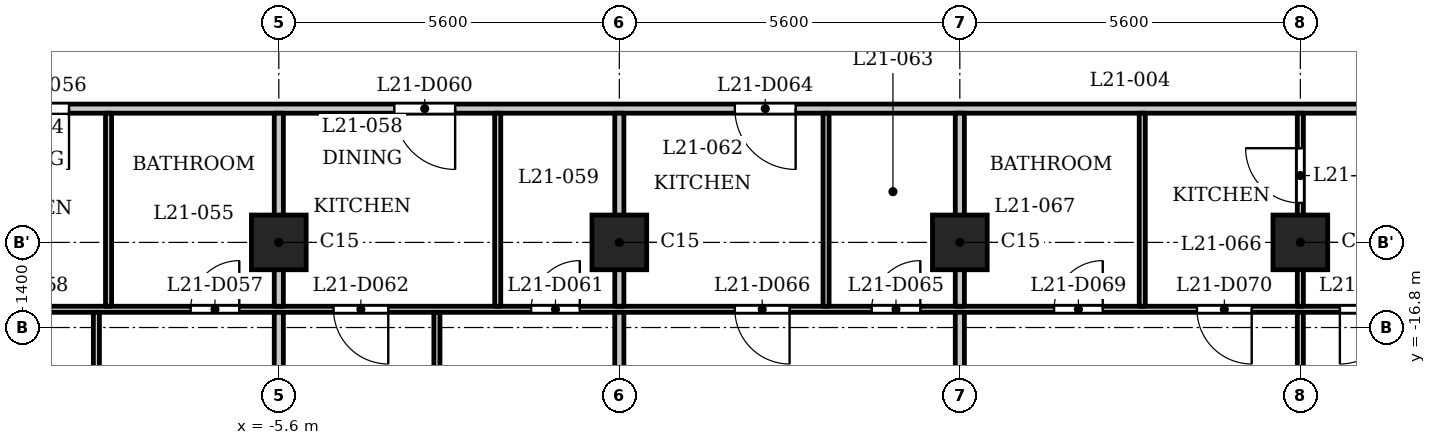
"""IFC4 building model, lengths in metres.
Left out: names, types, materials, properties, quantities, classifications, styles, units other than length and angle.
Written with IfcOpenShell. Run it as: python <this file> out.ifc"""

import sys

from ifc_helpers import new_model, si_unit, direction, frame, frame_2d, origin, origin_2d, place, context, subcontext, project, spatial, rectangle, extrude, element, fill, save


model = new_model("IFC4")
c1 = context("Model", 3, precision=1e-05, world=origin(), true_north=direction((0.0, 1.0)))
c2 = subcontext(c1, "Body", "Model", "MODEL_VIEW")
j1 = project(units=[si_unit("LENGTHUNIT", "METRE"), si_unit("PLANEANGLEUNIT", "RADIAN")], contexts=[c1])
p1 = place(None, origin())
s1 = spatial("IfcSite", under=j1, at=p1, CompositionType="ELEMENT")
p2 = place(p1, origin())
s2 = spatial("IfcBuilding", under=s1, at=p2, CompositionType="ELEMENT")
p3 = place(p2, frame((0.0, 0.0, 86.8)))
s3 = spatial("IfcBuildingStorey", under=s2, at=p3, CompositionType="ELEMENT", Elevation=86.8)
for number, where, z_axis, x_axis in (
    (1, (-5.6, -15.4, 0.0), (0.0, 0.0, 1.0), (1.0, 0.0, 0.0)),
    (2, (0.0, -15.4, 0.0), (0.0, 0.0, 1.0), (1.0, 0.0, 0.0)),
    (3, (5.6, -15.4, 0.0), (0.0, 0.0, 1.0), (1.0, 0.0, 0.0)),
    (4, (11.2, -15.4, 0.0), (0.0, 0.0, 1.0), (1.0, 0.0, 0.0)),
):
    element("IfcColumn", number, at=place(p3, frame(where, z_axis=z_axis, x_axis=x_axis)), inside=s3, PredefinedType="COLUMN", context=c2, shape_type="SweptSolid", body=[
        extrude(rectangle(XDim=0.9, YDim=0.9, at=origin_2d()), origin(), (0.0, 0.0, 1.0), 3.5),
    ])
p4 = place(p3, frame((-16.725, -16.5, 0.0), z_axis=(0.0, 0.0, 1.0), x_axis=(1.0, 0.0, 0.0)))
e5 = element("IfcWall", 5, at=p4, inside=s3, PredefinedType="PARTITIONING", context=c2, shape_type="SweptSolid", body=[
    extrude(rectangle(XDim=33.45, YDim=0.1, at=frame_2d((16.725, 0.0))), origin(), (0.0, 0.0, 1.0), 3.2),
])
p5 = place(p4, frame((3.825, 0.0, 0.0)))
e6 = element("IfcOpeningElement", 6, at=p5, cuts=e5, PredefinedType="OPENING", context=c2, shape_type="SweptSolid", body=[
    extrude(rectangle(XDim=0.8, YDim=2.1, at=frame_2d((0.4, 1.05))), frame((0.0, 0.06, 0.0), z_axis=(0.0, -1.0, 0.0), x_axis=(1.0, 0.0, 0.0)), (0.0, 0.0, 1.0), 0.12),
])
p6 = place(p4, frame((1.825, 0.0, 0.0)))
e7 = element("IfcOpeningElement", 7, at=p6, cuts=e5, PredefinedType="OPENING", context=c2, shape_type="SweptSolid", body=[
    extrude(rectangle(XDim=0.9, YDim=2.1, at=frame_2d((0.45, 1.05))), frame((0.0, 0.06, 0.0), z_axis=(0.0, -1.0, 0.0), x_axis=(1.0, 0.0, 0.0)), (0.0, 0.0, 1.0), 0.12),
])
p7 = place(p4, frame((9.675, 0.0, 0.0)))
e8 = element("IfcOpeningElement", 8, at=p7, cuts=e5, PredefinedType="OPENING", context=c2, shape_type="SweptSolid", body=[
    extrude(rectangle(XDim=0.8, YDim=2.1, at=frame_2d((0.4, 1.05))), frame((0.0, 0.06, 0.0), z_axis=(0.0, -1.0, 0.0), x_axis=(1.0, 0.0, 0.0)), (0.0, 0.0, 1.0), 0.12),
])
p8 = place(p4, frame((6.425, 0.0, 0.0)))
e9 = element("IfcOpeningElement", 9, at=p8, cuts=e5, PredefinedType="OPENING", context=c2, shape_type="SweptSolid", body=[
    extrude(rectangle(XDim=0.9, YDim=2.1, at=frame_2d((0.45, 1.05))), frame((0.0, 0.06, 0.0), z_axis=(0.0, -1.0, 0.0), x_axis=(1.0, 0.0, 0.0)), (0.0, 0.0, 1.0), 0.12),
])
p9 = place(p4, frame((15.275, 0.0, 0.0)))
e10 = element("IfcOpeningElement", 10, at=p9, cuts=e5, PredefinedType="OPENING", context=c2, shape_type="SweptSolid", body=[
    extrude(rectangle(XDim=0.8, YDim=2.1, at=frame_2d((0.4, 1.05))), frame((0.0, 0.06, 0.0), z_axis=(0.0, -1.0, 0.0), x_axis=(1.0, 0.0, 0.0)), (0.0, 0.0, 1.0), 0.12),
])
p10 = place(p4, frame((12.025, 0.0, 0.0)))
e11 = element("IfcOpeningElement", 11, at=p10, cuts=e5, PredefinedType="OPENING", context=c2, shape_type="SweptSolid", body=[
    extrude(rectangle(XDim=0.9, YDim=2.1, at=frame_2d((0.45, 1.05))), frame((0.0, 0.06, 0.0), z_axis=(0.0, -1.0, 0.0), x_axis=(1.0, 0.0, 0.0)), (0.0, 0.0, 1.0), 0.12),
])
p11 = place(p4, frame((20.875, 0.0, 0.0)))
e12 = element("IfcOpeningElement", 12, at=p11, cuts=e5, PredefinedType="OPENING", context=c2, shape_type="SweptSolid", body=[
    extrude(rectangle(XDim=0.8, YDim=2.1, at=frame_2d((0.4, 1.05))), frame((0.0, 0.06, 0.0), z_axis=(0.0, -1.0, 0.0), x_axis=(1.0, 0.0, 0.0)), (0.0, 0.0, 1.0), 0.12),
])
p12 = place(p4, frame((18.625, 0.0, 0.0)))
e13 = element("IfcOpeningElement", 13, at=p12, cuts=e5, PredefinedType="OPENING", context=c2, shape_type="SweptSolid", body=[
    extrude(rectangle(XDim=0.9, YDim=2.1, at=frame_2d((0.45, 1.05))), frame((0.0, 0.06, 0.0), z_axis=(0.0, -1.0, 0.0), x_axis=(1.0, 0.0, 0.0)), (0.0, 0.0, 1.0), 0.12),
])
p13 = place(p4, frame((23.875, 0.0, 0.0)))
e14 = element("IfcOpeningElement", 14, at=p13, cuts=e5, PredefinedType="OPENING", context=c2, shape_type="SweptSolid", body=[
    extrude(rectangle(XDim=0.8, YDim=2.1, at=frame_2d((0.4, 1.05))), frame((0.0, 0.06, 0.0), z_axis=(0.0, -1.0, 0.0), x_axis=(1.0, 0.0, 0.0)), (0.0, 0.0, 1.0), 0.12),
])
p14 = place(p4, frame((26.225, 0.0, 0.0)))
e15 = element("IfcOpeningElement", 15, at=p14, cuts=e5, PredefinedType="OPENING", context=c2, shape_type="SweptSolid", body=[
    extrude(rectangle(XDim=0.9, YDim=2.1, at=frame_2d((0.45, 1.05))), frame((0.0, 0.06, 0.0), z_axis=(0.0, -1.0, 0.0), x_axis=(1.0, 0.0, 0.0)), (0.0, 0.0, 1.0), 0.12),
])
p15 = place(p4, frame((28.575, 0.0, 0.0)))
e16 = element("IfcOpeningElement", 16, at=p15, cuts=e5, PredefinedType="OPENING", context=c2, shape_type="SweptSolid", body=[
    extrude(rectangle(XDim=0.9, YDim=2.1, at=frame_2d((0.45, 1.05))), frame((0.0, 0.06, 0.0), z_axis=(0.0, -1.0, 0.0), x_axis=(1.0, 0.0, 0.0)), (0.0, 0.0, 1.0), 0.12),
])
p16 = place(p4, frame((30.675, 0.0, 0.0)))
e17 = element("IfcOpeningElement", 17, at=p16, cuts=e5, PredefinedType="OPENING", context=c2, shape_type="SweptSolid", body=[
    extrude(rectangle(XDim=0.9, YDim=2.1, at=frame_2d((0.45, 1.05))), frame((0.0, 0.06, 0.0), z_axis=(0.0, -1.0, 0.0), x_axis=(1.0, 0.0, 0.0)), (0.0, 0.0, 1.0), 0.12),
])
p17 = place(p3, frame((-17.4, -13.2, 0.0), z_axis=(0.0, 0.0, 1.0), x_axis=(1.0, 0.0, 0.0)))
e18 = element("IfcWall", 18, at=p17, inside=s3, PredefinedType="PARTITIONING", context=c2, shape_type="SweptSolid", body=[
    extrude(rectangle(XDim=34.8, YDim=0.15, at=frame_2d((17.4, 0.0))), origin(), (0.0, 0.0, 1.0), 3.2),
])
p18 = place(p17, frame((0.15, 0.0, 0.0)))
e19 = element("IfcOpeningElement", 19, at=p18, cuts=e18, PredefinedType="OPENING", context=c2, shape_type="SweptSolid", body=[
    extrude(rectangle(XDim=1.0, YDim=2.1, at=frame_2d((0.5, 1.05))), frame((0.0, 0.085, 0.0), z_axis=(0.0, -1.0, 0.0), x_axis=(1.0, 0.0, 0.0)), (0.0, 0.0, 1.0), 0.17),
])
p19 = place(p17, frame((33.55, 0.0, 0.0)))
e20 = element("IfcOpeningElement", 20, at=p19, cuts=e18, PredefinedType="OPENING", context=c2, shape_type="SweptSolid", body=[
    extrude(rectangle(XDim=1.0, YDim=2.1, at=frame_2d((0.5, 1.05))), frame((0.0, 0.085, 0.0), z_axis=(0.0, -1.0, 0.0), x_axis=(1.0, 0.0, 0.0)), (0.0, 0.0, 1.0), 0.17),
])
p20 = place(p17, frame((7.35, 0.0, 0.0)))
e21 = element("IfcOpeningElement", 21, at=p20, cuts=e18, PredefinedType="OPENING", context=c2, shape_type="SweptSolid", body=[
    extrude(rectangle(XDim=1.0, YDim=2.1, at=frame_2d((0.5, 1.05))), frame((0.0, 0.085, 0.0), z_axis=(0.0, -1.0, 0.0), x_axis=(1.0, 0.0, 0.0)), (0.0, 0.0, 1.0), 0.17),
])
p21 = place(p17, frame((13.7, 0.0, 0.0)))
e22 = element("IfcOpeningElement", 22, at=p21, cuts=e18, PredefinedType="OPENING", context=c2, shape_type="SweptSolid", body=[
    extrude(rectangle(XDim=1.0, YDim=2.1, at=frame_2d((0.5, 1.05))), frame((0.0, 0.085, 0.0), z_axis=(0.0, -1.0, 0.0), x_axis=(1.0, 0.0, 0.0)), (0.0, 0.0, 1.0), 0.17),
])
p22 = place(p17, frame((19.3, 0.0, 0.0)))
e23 = element("IfcOpeningElement", 23, at=p22, cuts=e18, PredefinedType="OPENING", context=c2, shape_type="SweptSolid", body=[
    extrude(rectangle(XDim=1.0, YDim=2.1, at=frame_2d((0.5, 1.05))), frame((0.0, 0.085, 0.0), z_axis=(0.0, -1.0, 0.0), x_axis=(1.0, 0.0, 0.0)), (0.0, 0.0, 1.0), 0.17),
])
p23 = place(p3, frame((-8.6, -22.08, 0.0), z_axis=(0.0, 0.0, 1.0), x_axis=(0.0, 1.0, 0.0)))
e24 = element("IfcWall", 24, at=p23, inside=s3, PredefinedType="PARTITIONING", context=c2, shape_type="SweptSolid", body=[
    extrude(rectangle(XDim=5.53, YDim=0.1, at=frame_2d((2.765, 0.0))), origin(), (0.0, 0.0, 1.0), 3.2),
])
p24 = place(p23, frame((0.42, 0.0, 0.0)))
e25 = element("IfcOpeningElement", 25, at=p24, cuts=e24, PredefinedType="OPENING", context=c2, shape_type="SweptSolid", body=[
    extrude(rectangle(XDim=0.9, YDim=2.1, at=frame_2d((0.45, 1.05))), frame((0.0, 0.06, 0.0), z_axis=(0.0, -1.0, 0.0), x_axis=(1.0, 0.0, 0.0)), (0.0, 0.0, 1.0), 0.12),
])
p25 = place(p3, frame((-8.4, -16.45, 0.0), z_axis=(0.0, 0.0, 1.0), x_axis=(0.0, 1.0, 0.0)))
e26 = element("IfcWall", 26, at=p25, inside=s3, PredefinedType="PARTITIONING", context=c2, shape_type="SweptSolid", body=[
    extrude(rectangle(XDim=3.175, YDim=0.1, at=frame_2d((1.587, 0.0))), origin(), (0.0, 0.0, 1.0), 3.2),
])
p26 = place(p3, frame((-5.6, -23.03, 0.0), z_axis=(0.0, 0.0, 1.0), x_axis=(0.0, 1.0, 0.0)))
e27 = element("IfcWall", 27, at=p26, inside=s3, PredefinedType="PARTITIONING", context=c2, shape_type="SweptSolid", body=[
    extrude(rectangle(XDim=6.48, YDim=0.15, at=frame_2d((3.24, 0.0))), origin(), (0.0, 0.0, 1.0), 3.2),
])
p27 = place(p3, frame((-5.6, -16.45, 0.0), z_axis=(0.0, 0.0, 1.0), x_axis=(0.0, 1.0, 0.0)))
e28 = element("IfcWall", 28, at=p27, inside=s3, PredefinedType="PARTITIONING", context=c2, shape_type="SweptSolid", body=[
    extrude(rectangle(XDim=3.175, YDim=0.15, at=frame_2d((1.587, 0.0))), origin(), (0.0, 0.0, 1.0), 3.2),
])
p28 = place(p3, frame((-3.0, -22.08, 0.0), z_axis=(0.0, 0.0, 1.0), x_axis=(0.0, 1.0, 0.0)))
e29 = element("IfcWall", 29, at=p28, inside=s3, PredefinedType="PARTITIONING", context=c2, shape_type="SweptSolid", body=[
    extrude(rectangle(XDim=5.53, YDim=0.1, at=frame_2d((2.765, 0.0))), origin(), (0.0, 0.0, 1.0), 3.2),
])
p29 = place(p28, frame((0.42, 0.0, 0.0)))
e30 = element("IfcOpeningElement", 30, at=p29, cuts=e29, PredefinedType="OPENING", context=c2, shape_type="SweptSolid", body=[
    extrude(rectangle(XDim=0.9, YDim=2.1, at=frame_2d((0.45, 1.05))), frame((0.0, 0.06, 0.0), z_axis=(0.0, -1.0, 0.0), x_axis=(1.0, 0.0, 0.0)), (0.0, 0.0, 1.0), 0.12),
])
p30 = place(p3, frame((-2.0, -16.45, 0.0), z_axis=(0.0, 0.0, 1.0), x_axis=(0.0, 1.0, 0.0)))
e31 = element("IfcWall", 31, at=p30, inside=s3, PredefinedType="PARTITIONING", context=c2, shape_type="SweptSolid", body=[
    extrude(rectangle(XDim=3.175, YDim=0.1, at=frame_2d((1.587, 0.0))), origin(), (0.0, 0.0, 1.0), 3.2),
])
p31 = place(p3, frame((0.0, -23.03, 0.0), z_axis=(0.0, 0.0, 1.0), x_axis=(0.0, 1.0, 0.0)))
e32 = element("IfcWall", 32, at=p31, inside=s3, PredefinedType="PARTITIONING", context=c2, shape_type="SweptSolid", body=[
    extrude(rectangle(XDim=6.48, YDim=0.15, at=frame_2d((3.24, 0.0))), origin(), (0.0, 0.0, 1.0), 3.2),
])
p32 = place(p3, frame((0.0, -16.45, 0.0), z_axis=(0.0, 0.0, 1.0), x_axis=(0.0, 1.0, 0.0)))
e33 = element("IfcWall", 33, at=p32, inside=s3, PredefinedType="PARTITIONING", context=c2, shape_type="SweptSolid", body=[
    extrude(rectangle(XDim=3.175, YDim=0.15, at=frame_2d((1.587, 0.0))), origin(), (0.0, 0.0, 1.0), 3.2),
])
p33 = place(p3, frame((3.4, -16.45, 0.0), z_axis=(0.0, 0.0, 1.0), x_axis=(0.0, 1.0, 0.0)))
e34 = element("IfcWall", 34, at=p33, inside=s3, PredefinedType="PARTITIONING", context=c2, shape_type="SweptSolid", body=[
    extrude(rectangle(XDim=3.175, YDim=0.1, at=frame_2d((1.587, 0.0))), origin(), (0.0, 0.0, 1.0), 3.2),
])
p34 = place(p3, frame((5.6, -23.03, 0.0), z_axis=(0.0, 0.0, 1.0), x_axis=(0.0, 1.0, 0.0)))
e35 = element("IfcWall", 35, at=p34, inside=s3, PredefinedType="PARTITIONING", context=c2, shape_type="SweptSolid", body=[
    extrude(rectangle(XDim=6.48, YDim=0.15, at=frame_2d((3.24, 0.0))), origin(), (0.0, 0.0, 1.0), 3.2),
])
p35 = place(p3, frame((5.6, -16.45, 0.0), z_axis=(0.0, 0.0, 1.0), x_axis=(0.0, 1.0, 0.0)))
e36 = element("IfcWall", 36, at=p35, inside=s3, PredefinedType="PARTITIONING", context=c2, shape_type="SweptSolid", body=[
    extrude(rectangle(XDim=3.175, YDim=0.15, at=frame_2d((1.587, 0.0))), origin(), (0.0, 0.0, 1.0), 3.2),
])
p36 = place(p3, frame((8.6, -16.45, 0.0), z_axis=(0.0, 0.0, 1.0), x_axis=(0.0, 1.0, 0.0)))
e37 = element("IfcWall", 37, at=p36, inside=s3, PredefinedType="PARTITIONING", context=c2, shape_type="SweptSolid", body=[
    extrude(rectangle(XDim=3.175, YDim=0.1, at=frame_2d((1.587, 0.0))), origin(), (0.0, 0.0, 1.0), 3.2),
])
p37 = place(p3, frame((11.2, -23.03, 0.0), z_axis=(0.0, 0.0, 1.0), x_axis=(0.0, 1.0, 0.0)))
e38 = element("IfcWall", 38, at=p37, inside=s3, PredefinedType="PARTITIONING", context=c2, shape_type="SweptSolid", body=[
    extrude(rectangle(XDim=6.48, YDim=0.1, at=frame_2d((3.24, 0.0))), origin(), (0.0, 0.0, 1.0), 3.2),
])
p38 = place(p3, frame((11.2, -16.45, 0.0), z_axis=(0.0, 0.0, 1.0), x_axis=(0.0, 1.0, 0.0)))
e39 = element("IfcWall", 39, at=p38, inside=s3, PredefinedType="PARTITIONING", context=c2, shape_type="SweptSolid", body=[
    extrude(rectangle(XDim=3.175, YDim=0.1, at=frame_2d((1.587, 0.0))), origin(), (0.0, 0.0, 1.0), 3.2),
])
p39 = place(p38, frame((1.699, 0.0, 0.0)))
e40 = element("IfcOpeningElement", 40, at=p39, cuts=e39, PredefinedType="OPENING", context=c2, shape_type="SweptSolid", body=[
    extrude(rectangle(XDim=0.9, YDim=2.1, at=frame_2d((0.45, 1.05))), frame((0.0, 0.06, 0.0), z_axis=(0.0, -1.0, 0.0), x_axis=(1.0, 0.0, 0.0)), (0.0, 0.0, 1.0), 0.12),
])
p40 = place(p20, origin())
e41 = element("IfcDoor", 41, at=p40, inside=s3, OperationType="SINGLE_SWING_RIGHT", PredefinedType="DOOR", context=c2, shape_type="SweptSolid", body=[
    extrude(rectangle(XDim=1.0, YDim=2.1, at=frame_2d((0.5, 1.05))), frame((0.0, 0.025, 0.0), z_axis=(0.0, -1.0, 0.0), x_axis=(1.0, 0.0, 0.0)), (0.0, 0.0, 1.0), 0.05),
])
fill(e21, e41)
p41 = place(p7, origin())
e42 = element("IfcDoor", 42, at=p41, inside=s3, OperationType="SINGLE_SWING_LEFT", PredefinedType="DOOR", context=c2, shape_type="SweptSolid", body=[
    extrude(rectangle(XDim=0.8, YDim=2.1, at=frame_2d((0.4, 1.05))), frame((0.0, 0.025, 0.0), z_axis=(0.0, -1.0, 0.0), x_axis=(1.0, 0.0, 0.0)), (0.0, 0.0, 1.0), 0.05),
])
fill(e8, e42)
p42 = place(p21, origin())
e43 = element("IfcDoor", 43, at=p42, inside=s3, OperationType="SINGLE_SWING_RIGHT", PredefinedType="DOOR", context=c2, shape_type="SweptSolid", body=[
    extrude(rectangle(XDim=1.0, YDim=2.1, at=frame_2d((0.5, 1.05))), frame((0.0, 0.025, 0.0), z_axis=(0.0, -1.0, 0.0), x_axis=(1.0, 0.0, 0.0)), (0.0, 0.0, 1.0), 0.05),
])
fill(e22, e43)
p43 = place(p9, origin())
e44 = element("IfcDoor", 44, at=p43, inside=s3, OperationType="SINGLE_SWING_LEFT", PredefinedType="DOOR", context=c2, shape_type="SweptSolid", body=[
    extrude(rectangle(XDim=0.8, YDim=2.1, at=frame_2d((0.4, 1.05))), frame((0.0, 0.025, 0.0), z_axis=(0.0, -1.0, 0.0), x_axis=(1.0, 0.0, 0.0)), (0.0, 0.0, 1.0), 0.05),
])
fill(e10, e44)
p44 = place(p10, origin())
e45 = element("IfcDoor", 45, at=p44, inside=s3, OperationType="SINGLE_SWING_RIGHT", PredefinedType="DOOR", context=c2, shape_type="SweptSolid", body=[
    extrude(rectangle(XDim=0.9, YDim=2.1, at=frame_2d((0.45, 1.05))), frame((0.0, 0.025, 0.0), z_axis=(0.0, -1.0, 0.0), x_axis=(1.0, 0.0, 0.0)), (0.0, 0.0, 1.0), 0.05),
])
fill(e11, e45)
p45 = place(p22, origin())
e46 = element("IfcDoor", 46, at=p45, inside=s3, OperationType="SINGLE_SWING_RIGHT", PredefinedType="DOOR", context=c2, shape_type="SweptSolid", body=[
    extrude(rectangle(XDim=1.0, YDim=2.1, at=frame_2d((0.5, 1.05))), frame((0.0, 0.025, 0.0), z_axis=(0.0, -1.0, 0.0), x_axis=(1.0, 0.0, 0.0)), (0.0, 0.0, 1.0), 0.05),
])
fill(e23, e46)
p46 = place(p11, origin())
e47 = element("IfcDoor", 47, at=p46, inside=s3, OperationType="SINGLE_SWING_LEFT", PredefinedType="DOOR", context=c2, shape_type="SweptSolid", body=[
    extrude(rectangle(XDim=0.8, YDim=2.1, at=frame_2d((0.4, 1.05))), frame((0.0, 0.025, 0.0), z_axis=(0.0, -1.0, 0.0), x_axis=(1.0, 0.0, 0.0)), (0.0, 0.0, 1.0), 0.05),
])
fill(e12, e47)
p47 = place(p12, origin())
e48 = element("IfcDoor", 48, at=p47, inside=s3, OperationType="SINGLE_SWING_RIGHT", PredefinedType="DOOR", context=c2, shape_type="SweptSolid", body=[
    extrude(rectangle(XDim=0.9, YDim=2.1, at=frame_2d((0.45, 1.05))), frame((0.0, 0.025, 0.0), z_axis=(0.0, -1.0, 0.0), x_axis=(1.0, 0.0, 0.0)), (0.0, 0.0, 1.0), 0.05),
])
fill(e13, e48)
p48 = place(p39, origin())
e49 = element("IfcDoor", 49, at=p48, inside=s3, OperationType="SINGLE_SWING_LEFT", PredefinedType="DOOR", context=c2, shape_type="SweptSolid", body=[
    extrude(rectangle(XDim=0.9, YDim=2.1, at=frame_2d((0.45, 1.05))), frame((0.0, 0.025, 0.0), z_axis=(0.0, -1.0, 0.0), x_axis=(1.0, 0.0, 0.0)), (0.0, 0.0, 1.0), 0.05),
])
fill(e40, e49)
p49 = place(p13, origin())
e50 = element("IfcDoor", 50, at=p49, inside=s3, OperationType="SINGLE_SWING_LEFT", PredefinedType="DOOR", context=c2, shape_type="SweptSolid", body=[
    extrude(rectangle(XDim=0.8, YDim=2.1, at=frame_2d((0.4, 1.05))), frame((0.0, 0.025, 0.0), z_axis=(0.0, -1.0, 0.0), x_axis=(1.0, 0.0, 0.0)), (0.0, 0.0, 1.0), 0.05),
])
fill(e14, e50)
p50 = place(p14, origin())
e51 = element("IfcDoor", 51, at=p50, inside=s3, OperationType="SINGLE_SWING_RIGHT", PredefinedType="DOOR", context=c2, shape_type="SweptSolid", body=[
    extrude(rectangle(XDim=0.9, YDim=2.1, at=frame_2d((0.45, 1.05))), frame((0.0, 0.025, 0.0), z_axis=(0.0, -1.0, 0.0), x_axis=(1.0, 0.0, 0.0)), (0.0, 0.0, 1.0), 0.05),
])
fill(e15, e51)
p51 = place(p15, origin())
e52 = element("IfcDoor", 52, at=p51, inside=s3, OperationType="SINGLE_SWING_LEFT", PredefinedType="DOOR", context=c2, shape_type="SweptSolid", body=[
    extrude(rectangle(XDim=0.9, YDim=2.1, at=frame_2d((0.45, 1.05))), frame((0.0, 0.025, 0.0), z_axis=(0.0, -1.0, 0.0), x_axis=(1.0, 0.0, 0.0)), (0.0, 0.0, 1.0), 0.05),
])
fill(e16, e52)
save(model, sys.argv[1])
